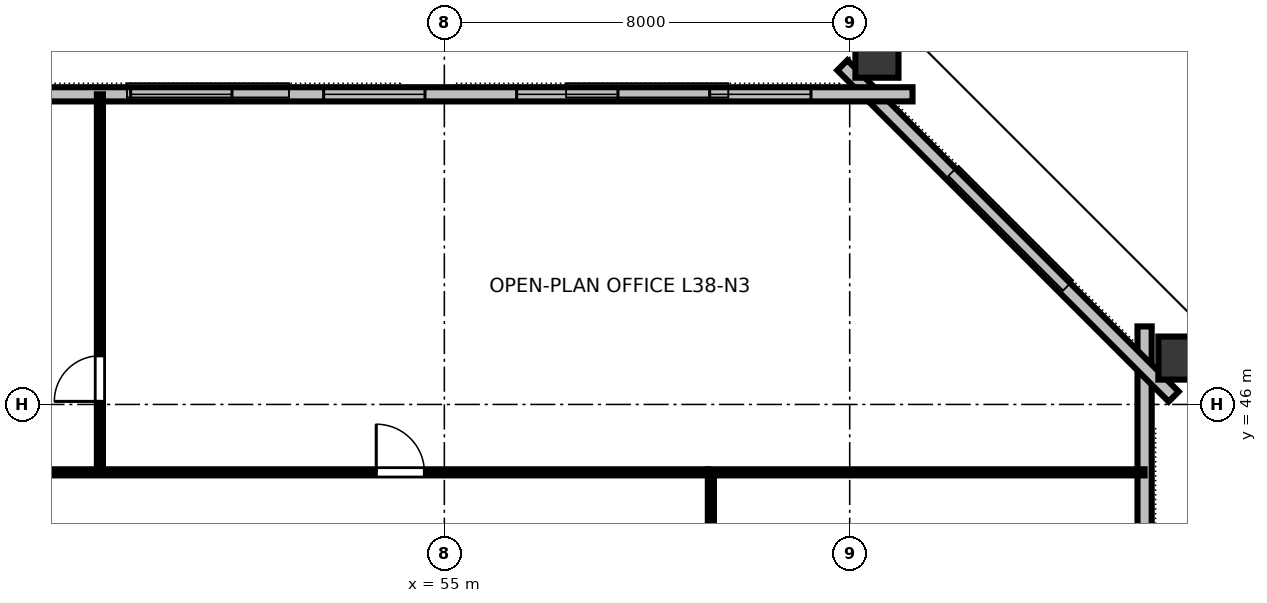
"""IFC4 building model, lengths in metres.
Left out: names, types, materials, properties, quantities, classifications, styles, units other than length and angle.
Written with IfcOpenShell. Run it as: python <this file> out.ifc"""

import sys

from ifc_helpers import new_model, si_unit, direction, frame, frame_2d, origin, origin_2d, place, context, subcontext, project, spatial, rectangle, hollow_rectangle, extrude, element, fill, save


model = new_model("IFC4")
c1 = context("Model", 3, precision=1e-05, world=origin(), true_north=direction((0.0, 1.0)))
c2 = subcontext(c1, "Body", "Model", "MODEL_VIEW")
j1 = project(units=[si_unit("LENGTHUNIT", "METRE"), si_unit("PLANEANGLEUNIT", "RADIAN")], contexts=[c1])
p1 = place(None, origin())
s1 = spatial("IfcSite", under=j1, at=p1, CompositionType="ELEMENT")
p2 = place(p1, origin())
s2 = spatial("IfcBuilding", under=s1, at=p2, CompositionType="ELEMENT")
p3 = place(p2, frame((0.0, 0.0, 145.6)))
s3 = spatial("IfcBuildingStorey", under=s2, at=p3, CompositionType="ELEMENT", Elevation=145.6)
p4 = place(p3, frame((69.591, 46.915, 0.0), z_axis=(0.088840732105, 0.044637403672, 0.995045137927), x_axis=(-0.889124879538, -0.446734568954, 0.099424209766)))
e1 = element("IfcColumn", 1, at=p4, inside=s3, PredefinedType="COLUMN", context=c2, shape_type="SweptSolid", body=[
    extrude(hollow_rectangle(XDim=0.85, YDim=1.0, WallThickness=0.05, at=origin_2d()), origin(), (0.0, 0.0, 1.0), 3.375),
])
p5 = place(p3, frame((63.538, 52.948, 0.0), z_axis=(0.059277862286, 0.074043044101, 0.995491719033), x_axis=(-0.780645414878, 0.624974188451, 0.0)))
e2 = element("IfcColumn", 2, at=p5, inside=s3, PredefinedType="COLUMN", context=c2, shape_type="SweptSolid", body=[
    extrude(hollow_rectangle(XDim=0.85, YDim=1.0, WallThickness=0.05, at=origin_2d()), origin(), (0.0, 0.0, 1.0), 3.373),
])
p6 = place(p3, frame((68.82, 16.46, 0.0), z_axis=(0.0, 0.0, 1.0), x_axis=(0.0, 1.0, 0.0)))
e3 = element("IfcWall", 3, at=p6, inside=s3, PredefinedType="STANDARD", context=c2, shape_type="SweptSolid", body=[
    extrude(rectangle(XDim=31.08, YDim=0.28, at=frame_2d((15.54, 0.0))), origin(), (0.0, 0.0, 1.0), 3.36),
])
p7 = place(p6, frame((11.86, 0.0, 0.0)))
e4 = element("IfcOpeningElement", 4, at=p7, cuts=e3, PredefinedType="OPENING", context=c2, shape_type="SweptSolid", body=[
    extrude(rectangle(XDim=1.4, YDim=2.15, at=frame_2d((0.7, 1.075))), frame((0.0, 0.15, 0.0), z_axis=(0.0, -1.0, 0.0), x_axis=(1.0, 0.0, 0.0)), (0.0, 0.0, 1.0), 0.3),
])
p8 = place(p6, frame((5.515, 0.0, 0.8)))
e5 = element("IfcOpeningElement", 5, at=p8, cuts=e3, PredefinedType="OPENING", context=c2, shape_type="SweptSolid", body=[
    extrude(rectangle(XDim=2.0, YDim=1.95, at=frame_2d((1.0, 0.975))), frame((0.0, 0.15, 0.0), z_axis=(0.0, -1.0, 0.0), x_axis=(1.0, 0.0, 0.0)), (0.0, 0.0, 1.0), 0.3),
])
p9 = place(p6, frame((9.125, 0.0, 0.8)))
e6 = element("IfcOpeningElement", 6, at=p9, cuts=e3, PredefinedType="OPENING", context=c2, shape_type="SweptSolid", body=[
    extrude(rectangle(XDim=2.0, YDim=1.95, at=frame_2d((1.0, 0.975))), frame((0.0, 0.15, 0.0), z_axis=(0.0, -1.0, 0.0), x_axis=(1.0, 0.0, 0.0)), (0.0, 0.0, 1.0), 0.3),
])
p10 = place(p6, frame((19.955, 0.0, 0.8)))
e7 = element("IfcOpeningElement", 7, at=p10, cuts=e3, PredefinedType="OPENING", context=c2, shape_type="SweptSolid", body=[
    extrude(rectangle(XDim=2.0, YDim=1.95, at=frame_2d((1.0, 0.975))), frame((0.0, 0.15, 0.0), z_axis=(0.0, -1.0, 0.0), x_axis=(1.0, 0.0, 0.0)), (0.0, 0.0, 1.0), 0.3),
])
p11 = place(p6, frame((23.565, 0.0, 0.8)))
e8 = element("IfcOpeningElement", 8, at=p11, cuts=e3, PredefinedType="OPENING", context=c2, shape_type="SweptSolid", body=[
    extrude(rectangle(XDim=2.0, YDim=1.95, at=frame_2d((1.0, 0.975))), frame((0.0, 0.15, 0.0), z_axis=(0.0, -1.0, 0.0), x_axis=(1.0, 0.0, 0.0)), (0.0, 0.0, 1.0), 0.3),
])
p12 = place(p3, frame((69.394, 46.155, 0.0), z_axis=(0.0, 0.0, 1.0), x_axis=(-0.707106781187, 0.707106781187, 0.0)))
e9 = element("IfcWall", 9, at=p12, inside=s3, PredefinedType="STANDARD", context=c2, shape_type="SweptSolid", body=[
    extrude(rectangle(XDim=9.248, YDim=0.28, at=frame_2d((4.624, 0.0))), origin(), (0.0, 0.0, 1.0), 3.36),
])
p13 = place(p3, frame((64.24, 52.12, 0.0), z_axis=(0.0, 0.0, 1.0), x_axis=(-1.0, 0.0, 0.0)))
e10 = element("IfcWall", 10, at=p13, inside=s3, PredefinedType="STANDARD", context=c2, shape_type="SweptSolid", body=[
    extrude(rectangle(XDim=36.48, YDim=0.28, at=frame_2d((18.24, 0.0))), origin(), (0.0, 0.0, 1.0), 3.36),
])
p14 = place(p13, frame((2.004, 0.0, 0.8)))
e11 = element("IfcOpeningElement", 11, at=p14, cuts=e10, PredefinedType="OPENING", context=c2, shape_type="SweptSolid", body=[
    extrude(rectangle(XDim=2.0, YDim=1.95, at=frame_2d((1.0, 0.975))), frame((0.0, 0.15, 0.0), z_axis=(0.0, -1.0, 0.0), x_axis=(1.0, 0.0, 0.0)), (0.0, 0.0, 1.0), 0.3),
])
p15 = place(p13, frame((5.813, 0.0, 0.8)))
e12 = element("IfcOpeningElement", 12, at=p15, cuts=e10, PredefinedType="OPENING", context=c2, shape_type="SweptSolid", body=[
    extrude(rectangle(XDim=2.0, YDim=1.95, at=frame_2d((1.0, 0.975))), frame((0.0, 0.15, 0.0), z_axis=(0.0, -1.0, 0.0), x_axis=(1.0, 0.0, 0.0)), (0.0, 0.0, 1.0), 0.3),
])
p16 = place(p13, frame((9.622, 0.0, 0.8)))
e13 = element("IfcOpeningElement", 13, at=p16, cuts=e10, PredefinedType="OPENING", context=c2, shape_type="SweptSolid", body=[
    extrude(rectangle(XDim=2.0, YDim=1.95, at=frame_2d((1.0, 0.975))), frame((0.0, 0.15, 0.0), z_axis=(0.0, -1.0, 0.0), x_axis=(1.0, 0.0, 0.0)), (0.0, 0.0, 1.0), 0.3),
])
p17 = place(p13, frame((13.431, 0.0, 0.8)))
e14 = element("IfcOpeningElement", 14, at=p17, cuts=e10, PredefinedType="OPENING", context=c2, shape_type="SweptSolid", body=[
    extrude(rectangle(XDim=2.0, YDim=1.95, at=frame_2d((1.0, 0.975))), frame((0.0, 0.15, 0.0), z_axis=(0.0, -1.0, 0.0), x_axis=(1.0, 0.0, 0.0)), (0.0, 0.0, 1.0), 0.3),
])
p18 = place(p13, frame((21.049, 0.0, 0.8)))
e15 = element("IfcOpeningElement", 15, at=p18, cuts=e10, PredefinedType="OPENING", context=c2, shape_type="SweptSolid", body=[
    extrude(rectangle(XDim=2.0, YDim=1.95, at=frame_2d((1.0, 0.975))), frame((0.0, 0.15, 0.0), z_axis=(0.0, -1.0, 0.0), x_axis=(1.0, 0.0, 0.0)), (0.0, 0.0, 1.0), 0.3),
])
p19 = place(p13, frame((24.858, 0.0, 0.8)))
e16 = element("IfcOpeningElement", 16, at=p19, cuts=e10, PredefinedType="OPENING", context=c2, shape_type="SweptSolid", body=[
    extrude(rectangle(XDim=2.0, YDim=1.95, at=frame_2d((1.0, 0.975))), frame((0.0, 0.15, 0.0), z_axis=(0.0, -1.0, 0.0), x_axis=(1.0, 0.0, 0.0)), (0.0, 0.0, 1.0), 0.3),
])
p20 = place(p13, frame((28.667, 0.0, 0.8)))
e17 = element("IfcOpeningElement", 17, at=p20, cuts=e10, PredefinedType="OPENING", context=c2, shape_type="SweptSolid", body=[
    extrude(rectangle(XDim=2.0, YDim=1.95, at=frame_2d((1.0, 0.975))), frame((0.0, 0.15, 0.0), z_axis=(0.0, -1.0, 0.0), x_axis=(1.0, 0.0, 0.0)), (0.0, 0.0, 1.0), 0.3),
])
p21 = place(p13, frame((32.476, 0.0, 0.8)))
e18 = element("IfcOpeningElement", 18, at=p21, cuts=e10, PredefinedType="OPENING", context=c2, shape_type="SweptSolid", body=[
    extrude(rectangle(XDim=2.0, YDim=1.95, at=frame_2d((1.0, 0.975))), frame((0.0, 0.15, 0.0), z_axis=(0.0, -1.0, 0.0), x_axis=(1.0, 0.0, 0.0)), (0.0, 0.0, 1.0), 0.3),
])
p22 = place(p3, frame((48.202, 44.66, 0.0), z_axis=(0.0, 0.0, 1.0), x_axis=(0.0, 1.0, 0.0)))
e19 = element("IfcWall", 19, at=p22, inside=s3, PredefinedType="PARTITIONING", context=c2, shape_type="SweptSolid", body=[
    extrude(rectangle(XDim=7.46, YDim=0.12, at=frame_2d((3.73, 0.0))), origin(), (0.0, 0.0, 1.0), 2.64),
])
p23 = place(p22, frame((1.4, 0.0, 0.0)))
e20 = element("IfcOpeningElement", 20, at=p23, cuts=e19, PredefinedType="OPENING", context=c2, shape_type="SweptSolid", body=[
    extrude(rectangle(XDim=0.9, YDim=2.15, at=frame_2d((0.45, 1.075))), frame((0.0, 0.07, 0.0), z_axis=(0.0, -1.0, 0.0), x_axis=(1.0, 0.0, 0.0)), (0.0, 0.0, 1.0), 0.14),
])
p24 = place(p3, frame((31.8, 44.66, 0.0), z_axis=(0.0, 0.0, 1.0), x_axis=(1.0, 0.0, 0.0)))
e21 = element("IfcWall", 21, at=p24, inside=s3, PredefinedType="PARTITIONING", context=c2, shape_type="SweptSolid", body=[
    extrude(rectangle(XDim=28.4, YDim=0.12, at=frame_2d((14.2, 0.0))), origin(), (0.0, 0.0, 1.0), 2.64),
])
p25 = place(p24, frame((3.705, 0.0, 0.0)))
e22 = element("IfcOpeningElement", 22, at=p25, cuts=e21, PredefinedType="OPENING", context=c2, shape_type="SweptSolid", body=[
    extrude(rectangle(XDim=0.95, YDim=2.15, at=frame_2d((0.475, 1.075))), frame((0.0, 0.07, 0.0), z_axis=(0.0, -1.0, 0.0), x_axis=(1.0, 0.0, 0.0)), (0.0, 0.0, 1.0), 0.14),
])
p26 = place(p24, frame((11.836, 0.0, 0.0)))
e23 = element("IfcOpeningElement", 23, at=p26, cuts=e21, PredefinedType="OPENING", context=c2, shape_type="SweptSolid", body=[
    extrude(rectangle(XDim=0.95, YDim=2.15, at=frame_2d((0.475, 1.075))), frame((0.0, 0.07, 0.0), z_axis=(0.0, -1.0, 0.0), x_axis=(1.0, 0.0, 0.0)), (0.0, 0.0, 1.0), 0.14),
])
p27 = place(p24, frame((21.856, 0.0, 0.0)))
e24 = element("IfcOpeningElement", 24, at=p27, cuts=e21, PredefinedType="OPENING", context=c2, shape_type="SweptSolid", body=[
    extrude(rectangle(XDim=0.95, YDim=2.15, at=frame_2d((0.475, 1.075))), frame((0.0, 0.07, 0.0), z_axis=(0.0, -1.0, 0.0), x_axis=(1.0, 0.0, 0.0)), (0.0, 0.0, 1.0), 0.14),
])
p28 = place(p3, frame((60.26, 33.02, 0.0), z_axis=(0.0, 0.0, 1.0), x_axis=(0.0, 1.0, 0.0)))
e25 = element("IfcWall", 25, at=p28, inside=s3, PredefinedType="PARTITIONING", context=c2, shape_type="SweptSolid", body=[
    extrude(rectangle(XDim=11.58, YDim=0.12, at=frame_2d((5.79, 0.0))), origin(), (0.0, 0.0, 1.0), 2.64),
])
p29 = place(p28, frame((5.775, 0.0, 0.0)))
e26 = element("IfcOpeningElement", 26, at=p29, cuts=e25, PredefinedType="OPENING", context=c2, shape_type="SweptSolid", body=[
    extrude(rectangle(XDim=0.95, YDim=2.15, at=frame_2d((0.475, 1.075))), frame((0.0, 0.07, 0.0), z_axis=(0.0, -1.0, 0.0), x_axis=(1.0, 0.0, 0.0)), (0.0, 0.0, 1.0), 0.14),
])
p30 = place(p3, frame((60.2, 44.66, 0.0), z_axis=(0.0, 0.0, 1.0), x_axis=(1.0, 0.0, 0.0)))
e27 = element("IfcWall", 27, at=p30, inside=s3, PredefinedType="PARTITIONING", context=c2, shape_type="SweptSolid", body=[
    extrude(rectangle(XDim=8.62, YDim=0.12, at=frame_2d((4.31, 0.0))), origin(), (0.0, 0.0, 1.0), 2.64),
])
p31 = place(p14, origin())
e28 = element("IfcWindow", 28, at=p31, inside=s3, PartitioningType="SINGLE_PANEL", PredefinedType="WINDOW", context=c2, shape_type="SweptSolid", body=[
    extrude(rectangle(XDim=2.0, YDim=1.95, at=frame_2d((1.0, 0.975))), frame((0.0, 0.03, 0.0), z_axis=(0.0, -1.0, 0.0), x_axis=(1.0, 0.0, 0.0)), (0.0, 0.0, 1.0), 0.06),
])
fill(e11, e28)
p32 = place(p15, origin())
e29 = element("IfcWindow", 29, at=p32, inside=s3, PartitioningType="SINGLE_PANEL", PredefinedType="WINDOW", context=c2, shape_type="SweptSolid", body=[
    extrude(rectangle(XDim=2.0, YDim=1.95, at=frame_2d((1.0, 0.975))), frame((0.0, 0.03, 0.0), z_axis=(0.0, -1.0, 0.0), x_axis=(1.0, 0.0, 0.0)), (0.0, 0.0, 1.0), 0.06),
])
fill(e12, e29)
p33 = place(p16, origin())
e30 = element("IfcWindow", 30, at=p33, inside=s3, PartitioningType="SINGLE_PANEL", PredefinedType="WINDOW", context=c2, shape_type="SweptSolid", body=[
    extrude(rectangle(XDim=2.0, YDim=1.95, at=frame_2d((1.0, 0.975))), frame((0.0, 0.03, 0.0), z_axis=(0.0, -1.0, 0.0), x_axis=(1.0, 0.0, 0.0)), (0.0, 0.0, 1.0), 0.06),
])
fill(e13, e30)
p34 = place(p17, origin())
e31 = element("IfcWindow", 31, at=p34, inside=s3, PartitioningType="SINGLE_PANEL", PredefinedType="WINDOW", context=c2, shape_type="SweptSolid", body=[
    extrude(rectangle(XDim=2.0, YDim=1.95, at=frame_2d((1.0, 0.975))), frame((0.0, 0.03, 0.0), z_axis=(0.0, -1.0, 0.0), x_axis=(1.0, 0.0, 0.0)), (0.0, 0.0, 1.0), 0.06),
])
fill(e14, e31)
p35 = place(p23, origin())
e32 = element("IfcDoor", 32, at=p35, inside=s3, OperationType="SINGLE_SWING_LEFT", PredefinedType="DOOR", context=c2, shape_type="SweptSolid", body=[
    extrude(rectangle(XDim=0.9, YDim=2.15, at=frame_2d((0.45, 1.075))), frame((0.0, 0.025, 0.0), z_axis=(0.0, -1.0, 0.0), x_axis=(1.0, 0.0, 0.0)), (0.0, 0.0, 1.0), 0.05),
])
fill(e20, e32)
p36 = place(p27, origin())
e33 = element("IfcDoor", 33, at=p36, inside=s3, OperationType="SINGLE_SWING_LEFT", PredefinedType="DOOR", context=c2, shape_type="SweptSolid", body=[
    extrude(rectangle(XDim=0.95, YDim=2.15, at=frame_2d((0.475, 1.075))), frame((0.0, 0.025, 0.0), z_axis=(0.0, -1.0, 0.0), x_axis=(1.0, 0.0, 0.0)), (0.0, 0.0, 1.0), 0.05),
])
fill(e24, e33)
save(model, sys.argv[1])
